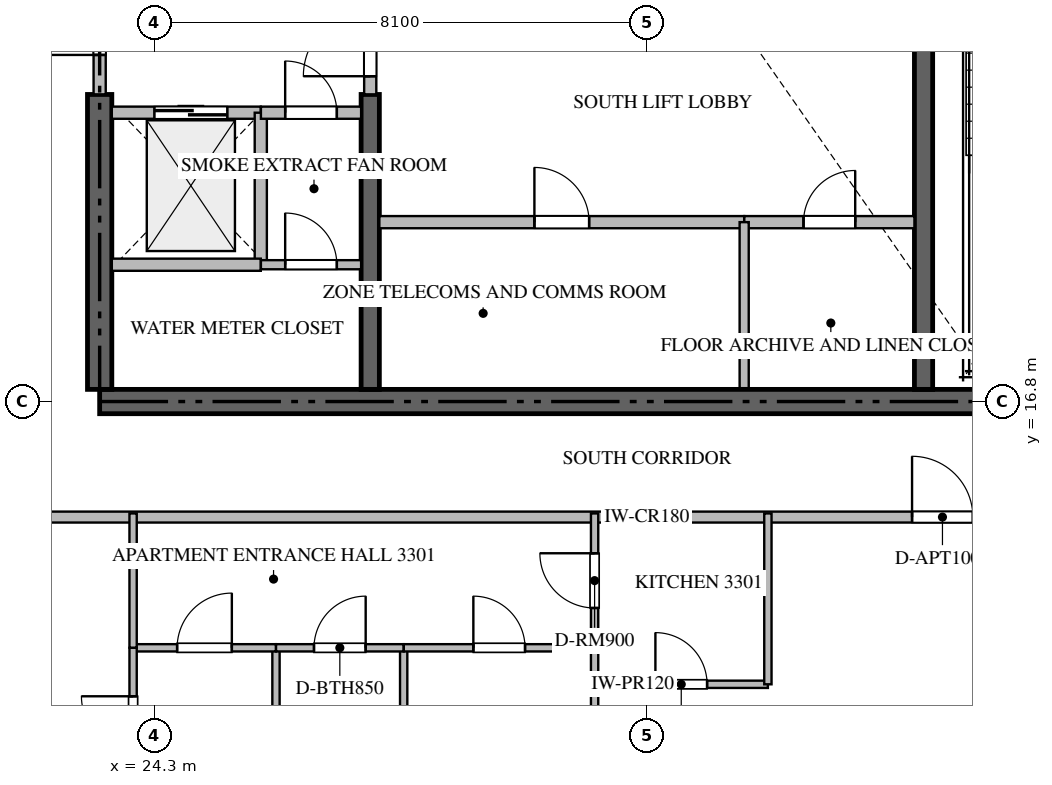
"""IFC4 building model, lengths in metres.
Left out: names, types, materials, properties, quantities, classifications, styles, units other than length and angle.
Written with IfcOpenShell. Run it as: python <this file> out.ifc"""

import sys

from ifc_helpers import new_model, si_unit, direction, frame, frame_2d, origin, place, context, subcontext, project, spatial, rectangle, extrude, source, transform, mapped, element, fill, save


model = new_model("IFC4")
c1 = context("Model", 3, precision=1e-05, world=origin(), true_north=direction((0.0, 1.0)))
c2 = subcontext(c1, "Body", "Model", "MODEL_VIEW")
j1 = project(units=[si_unit("LENGTHUNIT", "METRE"), si_unit("PLANEANGLEUNIT", "RADIAN")], contexts=[c1])
p1 = place(None, origin())
s1 = spatial("IfcSite", under=j1, at=p1, CompositionType="ELEMENT")
p2 = place(p1, origin())
s2 = spatial("IfcBuilding", under=s1, at=p2, CompositionType="ELEMENT")
p3 = place(p2, frame((0.0, 0.0, 135.15)))
s3 = spatial("IfcBuildingStorey", under=s2, at=p3, CompositionType="ELEMENT", Elevation=135.15)
p4 = place(p3, frame((23.4, 16.8, -0.26), z_axis=(0.0, 0.0, 1.0), x_axis=(1.0, 0.0, 0.0)))
e1 = element("IfcWall", 1, at=p4, inside=s3, PredefinedType="SHEAR", context=c2, shape_type="SweptSolid", body=[
    extrude(rectangle(XDim=18.0, YDim=0.4, at=frame_2d((9.0, 0.0))), origin(), (0.0, 0.0, 1.0), 3.748),
])
p5 = place(p3, frame((23.4, 17.0, -0.26), z_axis=(0.0, 0.0, 1.0), x_axis=(0.0, 1.0, 0.0)))
e2 = element("IfcWall", 2, at=p5, inside=s3, PredefinedType="SHEAR", context=c2, shape_type="SweptSolid", body=[
    extrude(rectangle(XDim=4.85, YDim=0.4, at=frame_2d((2.425, 0.0))), origin(), (0.0, 0.0, 1.0), 3.748),
])
p6 = place(p3, frame((27.85, 17.0, -0.26), z_axis=(0.0, 0.0, 1.0), x_axis=(0.0, 1.0, 0.0)))
e3 = element("IfcWall", 3, at=p6, inside=s3, PredefinedType="SHEAR", context=c2, shape_type="SweptSolid", body=[
    extrude(rectangle(XDim=4.85, YDim=0.3, at=frame_2d((2.425, 0.0))), origin(), (0.0, 0.0, 1.0), 3.748),
])
p7 = place(p3, frame((36.95, 17.0, -0.26), z_axis=(0.0, 0.0, 1.0), x_axis=(0.0, 1.0, 0.0)))
e4 = element("IfcWall", 4, at=p7, inside=s3, PredefinedType="SHEAR", context=c2, shape_type="SweptSolid", body=[
    extrude(rectangle(XDim=8.35, YDim=0.3, at=frame_2d((4.175, 0.0))), origin(), (0.0, 0.0, 1.0), 3.748),
])
p8 = place(p3, frame((23.6, 21.55, 0.0), z_axis=(0.0, 0.0, 1.0), x_axis=(1.0, 0.0, 0.0)))
e5 = element("IfcWall", 5, at=p8, inside=s3, PredefinedType="STANDARD", context=c2, shape_type="SweptSolid", body=[
    extrude(rectangle(XDim=2.45, YDim=0.2, at=frame_2d((1.225, 0.0))), origin(), (0.0, 0.0, 1.0), 3.49),
])
p9 = place(p8, frame((0.7, 0.0, 0.0)))
e6 = element("IfcOpeningElement", 6, at=p9, cuts=e5, PredefinedType="OPENING", context=c2, shape_type="SweptSolid", body=[
    extrude(rectangle(XDim=1.2, YDim=2.2, at=frame_2d((0.6, 1.1))), frame((0.0, 0.11, 0.0), z_axis=(0.0, -1.0, 0.0), x_axis=(1.0, 0.0, 0.0)), (0.0, 0.0, 1.0), 0.22),
])
p10 = place(p3, frame((26.05, 19.05, 0.0), z_axis=(0.0, 0.0, 1.0), x_axis=(0.0, 1.0, 0.0)))
e7 = element("IfcWall", 7, at=p10, inside=s3, PredefinedType="STANDARD", context=c2, shape_type="SweptSolid", body=[
    extrude(rectangle(XDim=2.5, YDim=0.2, at=frame_2d((1.25, 0.0))), origin(), (0.0, 0.0, 1.0), 3.49),
])
p11 = place(p3, frame((23.6, 19.05, 0.0), z_axis=(0.0, 0.0, 1.0), x_axis=(1.0, 0.0, 0.0)))
e8 = element("IfcWall", 8, at=p11, inside=s3, PredefinedType="STANDARD", context=c2, shape_type="SweptSolid", body=[
    extrude(rectangle(XDim=2.45, YDim=0.2, at=frame_2d((1.225, 0.0))), origin(), (0.0, 0.0, 1.0), 3.49),
])
p12 = place(p3, frame((26.052, 21.55, 0.0), z_axis=(0.0, 0.0, 1.0), x_axis=(1.0, 0.0, 0.0)))
e9 = element("IfcWall", 9, at=p12, inside=s3, PredefinedType="STANDARD", context=c2, shape_type="SweptSolid", body=[
    extrude(rectangle(XDim=1.648, YDim=0.2, at=frame_2d((0.824, 0.0))), origin(), (0.0, 0.0, 1.0), 3.49),
])
p13 = place(p12, frame((0.399, 0.0, 0.0)))
e10 = element("IfcOpeningElement", 10, at=p13, cuts=e9, PredefinedType="OPENING", context=c2, shape_type="SweptSolid", body=[
    extrude(rectangle(XDim=0.85, YDim=2.1, at=frame_2d((0.425, 1.05))), frame((0.0, 0.11, 0.0), z_axis=(0.0, -1.0, 0.0), x_axis=(1.0, 0.0, 0.0)), (0.0, 0.0, 1.0), 0.22),
])
p14 = place(p3, frame((23.4, 21.852, 0.0), z_axis=(0.0, 0.0, 1.0), x_axis=(0.0, 1.0, 0.0)))
e11 = element("IfcWall", 11, at=p14, inside=s3, PredefinedType="STANDARD", context=c2, shape_type="SweptSolid", body=[
    extrude(rectangle(XDim=2.396, YDim=0.2, at=frame_2d((1.198, 0.0))), origin(), (0.0, 0.0, 1.0), 3.49),
])
p15 = place(p14, frame((0.648, 0.0, 0.0)))
e12 = element("IfcOpeningElement", 12, at=p15, cuts=e11, PredefinedType="OPENING", context=c2, shape_type="SweptSolid", body=[
    extrude(rectangle(XDim=1.1, YDim=2.15, at=frame_2d((0.55, 1.075))), frame((0.0, 0.11, 0.0), z_axis=(0.0, -1.0, 0.0), x_axis=(1.0, 0.0, 0.0)), (0.0, 0.0, 1.0), 0.22),
])
p16 = place(p3, frame((27.85, 21.852, 0.0), z_axis=(0.0, 0.0, 1.0), x_axis=(0.0, 1.0, 0.0)))
e13 = element("IfcWall", 13, at=p16, inside=s3, PredefinedType="STANDARD", context=c2, shape_type="SweptSolid", body=[
    extrude(rectangle(XDim=1.696, YDim=0.2, at=frame_2d((0.848, 0.0))), origin(), (0.0, 0.0, 1.0), 3.49),
])
p17 = place(p16, frame((0.298, 0.0, 0.0)))
e14 = element("IfcOpeningElement", 14, at=p17, cuts=e13, PredefinedType="OPENING", context=c2, shape_type="SweptSolid", body=[
    extrude(rectangle(XDim=1.1, YDim=2.15, at=frame_2d((0.55, 1.075))), frame((0.0, 0.11, 0.0), z_axis=(0.0, -1.0, 0.0), x_axis=(1.0, 0.0, 0.0)), (0.0, 0.0, 1.0), 0.22),
])
p18 = place(p3, frame((26.052, 19.05, 0.0), z_axis=(0.0, 0.0, 1.0), x_axis=(1.0, 0.0, 0.0)))
e15 = element("IfcWall", 15, at=p18, inside=s3, PredefinedType="PARTITIONING", context=c2, shape_type="SweptSolid", body=[
    extrude(rectangle(XDim=1.648, YDim=0.15, at=frame_2d((0.824, 0.0))), origin(), (0.0, 0.0, 1.0), 3.49),
])
p19 = place(p18, frame((0.399, 0.0, 0.0)))
e16 = element("IfcOpeningElement", 16, at=p19, cuts=e15, PredefinedType="OPENING", context=c2, shape_type="SweptSolid", body=[
    extrude(rectangle(XDim=0.85, YDim=2.1, at=frame_2d((0.425, 1.05))), frame((0.0, 0.085, 0.0), z_axis=(0.0, -1.0, 0.0), x_axis=(1.0, 0.0, 0.0)), (0.0, 0.0, 1.0), 0.17),
])
p20 = place(p3, frame((28.0, 19.75, 0.0), z_axis=(0.0, 0.0, 1.0), x_axis=(1.0, 0.0, 0.0)))
e17 = element("IfcWall", 17, at=p20, inside=s3, PredefinedType="STANDARD", context=c2, shape_type="SweptSolid", body=[
    extrude(rectangle(XDim=6.0, YDim=0.2, at=frame_2d((3.0, 0.0))), origin(), (0.0, 0.0, 1.0), 3.49),
])
p21 = place(p20, frame((2.55, 0.0, 0.0)))
e18 = element("IfcOpeningElement", 18, at=p21, cuts=e17, PredefinedType="OPENING", context=c2, shape_type="SweptSolid", body=[
    extrude(rectangle(XDim=0.9, YDim=2.1, at=frame_2d((0.45, 1.05))), frame((0.0, 0.11, 0.0), z_axis=(0.0, -1.0, 0.0), x_axis=(1.0, 0.0, 0.0)), (0.0, 0.0, 1.0), 0.22),
])
p22 = place(p3, frame((34.002, 19.75, 0.0), z_axis=(0.0, 0.0, 1.0), x_axis=(1.0, 0.0, 0.0)))
e19 = element("IfcWall", 19, at=p22, inside=s3, PredefinedType="STANDARD", context=c2, shape_type="SweptSolid", body=[
    extrude(rectangle(XDim=2.798, YDim=0.2, at=frame_2d((1.399, 0.0))), origin(), (0.0, 0.0, 1.0), 3.49),
])
p23 = place(p22, frame((0.974, 0.0, 0.0)))
e20 = element("IfcOpeningElement", 20, at=p23, cuts=e19, PredefinedType="OPENING", context=c2, shape_type="SweptSolid", body=[
    extrude(rectangle(XDim=0.85, YDim=2.1, at=frame_2d((0.425, 1.05))), frame((0.0, 0.11, 0.0), z_axis=(0.0, -1.0, 0.0), x_axis=(1.0, 0.0, 0.0)), (0.0, 0.0, 1.0), 0.22),
])
p24 = place(p3, frame((34.0, 17.02, 0.0), z_axis=(0.0, 0.0, 1.0), x_axis=(0.0, 1.0, 0.0)))
e21 = element("IfcWall", 21, at=p24, inside=s3, PredefinedType="PARTITIONING", context=c2, shape_type="SweptSolid", body=[
    extrude(rectangle(XDim=2.73, YDim=0.15, at=frame_2d((1.365, 0.0))), origin(), (0.0, 0.0, 1.0), 3.49),
])
p25 = place(p3, frame((20.952, 14.9, 0.0), z_axis=(0.0, 0.0, 1.0), x_axis=(1.0, 0.0, 0.0)))
e22 = element("IfcWall", 22, at=p25, inside=s3, PredefinedType="PARTITIONING", context=c2, shape_type="SweptSolid", body=[
    extrude(rectangle(XDim=22.896, YDim=0.18, at=frame_2d((11.448, 0.0))), origin(), (0.0, 0.0, 1.0), 3.49),
])
p26 = place(p25, frame((15.809, 0.0, 0.0)))
e23 = element("IfcOpeningElement", 23, at=p26, cuts=e22, PredefinedType="OPENING", context=c2, shape_type="SweptSolid", body=[
    extrude(rectangle(XDim=1.0, YDim=2.15, at=frame_2d((0.5, 1.075))), frame((0.0, 0.1, 0.0), z_axis=(0.0, -1.0, 0.0), x_axis=(1.0, 0.0, 0.0)), (0.0, 0.0, 1.0), 0.2),
])
p27 = place(p3, frame((31.54, 12.15, 0.0), z_axis=(0.0, 0.0, 1.0), x_axis=(1.0, 0.0, 0.0)))
e24 = element("IfcWall", 24, at=p27, inside=s3, PredefinedType="PARTITIONING", context=c2, shape_type="SweptSolid", body=[
    extrude(rectangle(XDim=2.85, YDim=0.12, at=frame_2d((1.425, 0.0))), origin(), (0.0, 0.0, 1.0), 3.49),
])
p28 = place(p27, frame((1.0, 0.0, 0.0)))
e25 = element("IfcOpeningElement", 25, at=p28, cuts=e24, PredefinedType="OPENING", context=c2, shape_type="SweptSolid", body=[
    extrude(rectangle(XDim=0.85, YDim=2.1, at=frame_2d((0.425, 1.05))), frame((0.0, 0.07, 0.0), z_axis=(0.0, -1.0, 0.0), x_axis=(1.0, 0.0, 0.0)), (0.0, 0.0, 1.0), 0.14),
])
p29 = place(p3, frame((34.39, 12.15, 0.0), z_axis=(0.0, 0.0, 1.0), x_axis=(0.0, 1.0, 0.0)))
e26 = element("IfcWall", 26, at=p29, inside=s3, PredefinedType="PARTITIONING", context=c2, shape_type="SweptSolid", body=[
    extrude(rectangle(XDim=2.81, YDim=0.12, at=frame_2d((1.405, 0.0))), origin(), (0.0, 0.0, 1.0), 3.49),
])
p30 = place(p3, frame((31.54, 12.75, 0.0), z_axis=(0.0, 0.0, 1.0), x_axis=(0.0, 1.0, 0.0)))
e27 = element("IfcWall", 27, at=p30, inside=s3, PredefinedType="PARTITIONING", context=c2, shape_type="SweptSolid", body=[
    extrude(rectangle(XDim=2.21, YDim=0.12, at=frame_2d((1.105, 0.0))), origin(), (0.0, 0.0, 1.0), 3.49),
])
p31 = place(p30, frame((0.655, 0.0, 0.0)))
e28 = element("IfcOpeningElement", 28, at=p31, cuts=e27, PredefinedType="OPENING", context=c2, shape_type="SweptSolid", body=[
    extrude(rectangle(XDim=0.9, YDim=2.1, at=frame_2d((0.45, 1.05))), frame((0.0, 0.07, 0.0), z_axis=(0.0, -1.0, 0.0), x_axis=(1.0, 0.0, 0.0)), (0.0, 0.0, 1.0), 0.14),
])
p32 = place(p3, frame((31.54, 7.947, 0.0), z_axis=(0.0, 0.0, 1.0), x_axis=(0.0, 1.0, 0.0)))
e29 = element("IfcWall", 29, at=p32, inside=s3, PredefinedType="PARTITIONING", context=c2, shape_type="SweptSolid", body=[
    extrude(rectangle(XDim=4.801, YDim=0.12, at=frame_2d((2.4, 0.0))), origin(), (0.0, 0.0, 1.0), 3.49),
])
p33 = place(p3, frame((26.3, 1.495, 0.0), z_axis=(0.0, 0.0, 1.0), x_axis=(0.0, 1.0, 0.0)))
e30 = element("IfcWall", 30, at=p33, inside=s3, PredefinedType="PARTITIONING", context=c2, shape_type="SweptSolid", body=[
    extrude(rectangle(XDim=11.255, YDim=0.12, at=frame_2d((5.627, 0.0))), origin(), (0.0, 0.0, 1.0), 3.49),
])
p34 = place(p3, frame((28.4, 7.945, 0.0), z_axis=(0.0, 0.0, 1.0), x_axis=(0.0, 1.0, 0.0)))
e31 = element("IfcWall", 31, at=p34, inside=s3, PredefinedType="PARTITIONING", context=c2, shape_type="SweptSolid", body=[
    extrude(rectangle(XDim=4.805, YDim=0.12, at=frame_2d((2.402, 0.0))), origin(), (0.0, 0.0, 1.0), 3.49),
])
p35 = place(p3, frame((26.3, 12.75, 0.0), z_axis=(0.0, 0.0, 1.0), x_axis=(1.0, 0.0, 0.0)))
e32 = element("IfcWall", 32, at=p35, inside=s3, PredefinedType="PARTITIONING", context=c2, shape_type="SweptSolid", body=[
    extrude(rectangle(XDim=2.1, YDim=0.12, at=frame_2d((1.05, 0.0))), origin(), (0.0, 0.0, 1.0), 3.49),
])
p36 = place(p35, frame((0.625, 0.0, 0.0)))
e33 = element("IfcOpeningElement", 33, at=p36, cuts=e32, PredefinedType="OPENING", context=c2, shape_type="SweptSolid", body=[
    extrude(rectangle(XDim=0.85, YDim=2.1, at=frame_2d((0.425, 1.05))), frame((0.0, 0.07, 0.0), z_axis=(0.0, -1.0, 0.0), x_axis=(1.0, 0.0, 0.0)), (0.0, 0.0, 1.0), 0.14),
])
p37 = place(p3, frame((28.402, 12.75, 0.0), z_axis=(0.0, 0.0, 1.0), x_axis=(1.0, 0.0, 0.0)))
e34 = element("IfcWall", 34, at=p37, inside=s3, PredefinedType="PARTITIONING", context=c2, shape_type="SweptSolid", body=[
    extrude(rectangle(XDim=3.138, YDim=0.12, at=frame_2d((1.569, 0.0))), origin(), (0.0, 0.0, 1.0), 3.49),
])
p38 = place(p37, frame((1.144, 0.0, 0.0)))
e35 = element("IfcOpeningElement", 35, at=p38, cuts=e34, PredefinedType="OPENING", context=c2, shape_type="SweptSolid", body=[
    extrude(rectangle(XDim=0.85, YDim=2.1, at=frame_2d((0.425, 1.05))), frame((0.0, 0.07, 0.0), z_axis=(0.0, -1.0, 0.0), x_axis=(1.0, 0.0, 0.0)), (0.0, 0.0, 1.0), 0.14),
])
p39 = place(p3, frame((23.95, 12.75, 0.0), z_axis=(0.0, 0.0, 1.0), x_axis=(1.0, 0.0, 0.0)))
e36 = element("IfcWall", 36, at=p39, inside=s3, PredefinedType="PARTITIONING", context=c2, shape_type="SweptSolid", body=[
    extrude(rectangle(XDim=2.348, YDim=0.12, at=frame_2d((1.174, 0.0))), origin(), (0.0, 0.0, 1.0), 3.49),
])
p40 = place(p39, frame((0.724, 0.0, 0.0)))
e37 = element("IfcOpeningElement", 37, at=p40, cuts=e36, PredefinedType="OPENING", context=c2, shape_type="SweptSolid", body=[
    extrude(rectangle(XDim=0.9, YDim=2.1, at=frame_2d((0.45, 1.05))), frame((0.0, 0.07, 0.0), z_axis=(0.0, -1.0, 0.0), x_axis=(1.0, 0.0, 0.0)), (0.0, 0.0, 1.0), 0.14),
])
p41 = place(p3, frame((23.95, 10.305, 0.0), z_axis=(0.0, 0.0, 1.0), x_axis=(0.0, 1.0, 0.0)))
e38 = element("IfcWall", 38, at=p41, inside=s3, PredefinedType="PARTITIONING", context=c2, shape_type="SweptSolid", body=[
    extrude(rectangle(XDim=2.445, YDim=0.12, at=frame_2d((1.223, 0.0))), origin(), (0.0, 0.0, 1.0), 3.49),
])
p42 = place(p41, frame((0.798, 0.0, 0.0)))
e39 = element("IfcOpeningElement", 39, at=p42, cuts=e38, PredefinedType="OPENING", context=c2, shape_type="SweptSolid", body=[
    extrude(rectangle(XDim=0.85, YDim=2.1, at=frame_2d((0.425, 1.05))), frame((0.0, 0.07, 0.0), z_axis=(0.0, -1.0, 0.0), x_axis=(1.0, 0.0, 0.0)), (0.0, 0.0, 1.0), 0.14),
])
p43 = place(p3, frame((23.95, 12.752, 0.0), z_axis=(0.0, 0.0, 1.0), x_axis=(0.0, 1.0, 0.0)))
e40 = element("IfcWall", 40, at=p43, inside=s3, PredefinedType="PARTITIONING", context=c2, shape_type="SweptSolid", body=[
    extrude(rectangle(XDim=2.208, YDim=0.12, at=frame_2d((1.104, 0.0))), origin(), (0.0, 0.0, 1.0), 3.49),
])
m1 = source(origin(), c2, "Body", "SweptSolid", [
    extrude(rectangle(XDim=1.2, YDim=2.2, at=frame_2d((0.6, 1.1))), frame((0.0, 0.025, 0.0), z_axis=(0.0, -1.0, 0.0), x_axis=(1.0, 0.0, 0.0)), (0.0, 0.0, 1.0), 0.05),
])
p44 = place(p9, origin())
e41 = element("IfcDoor", 41, at=p44, inside=s3, OperationType="DOUBLE_DOOR_SLIDING", PredefinedType="DOOR", context=c2, shape_type="MappedRepresentation", body=[
    mapped(m1, transform((0.0, 0.0, 0.0), scale=1.0)),
])
fill(e6, e41)
m2 = source(origin(), c2, "Body", "SweptSolid", [
    extrude(rectangle(XDim=0.85, YDim=2.1, at=frame_2d((0.425, 1.05))), frame((0.0, 0.025, 0.0), z_axis=(0.0, -1.0, 0.0), x_axis=(1.0, 0.0, 0.0)), (0.0, 0.0, 1.0), 0.05),
])
p45 = place(p13, origin())
e42 = element("IfcDoor", 42, at=p45, inside=s3, OperationType="SINGLE_SWING_LEFT", PredefinedType="DOOR", context=c2, shape_type="MappedRepresentation", body=[
    mapped(m2, transform((0.0, 0.0, 0.0), scale=1.0)),
])
fill(e10, e42)
m3 = source(origin(), c2, "Body", "SweptSolid", [
    extrude(rectangle(XDim=1.1, YDim=2.15, at=frame_2d((0.55, 1.075))), frame((0.0, 0.025, 0.0), z_axis=(0.0, -1.0, 0.0), x_axis=(1.0, 0.0, 0.0)), (0.0, 0.0, 1.0), 0.05),
])
p46 = place(p15, origin())
e43 = element("IfcDoor", 43, at=p46, inside=s3, OperationType="SINGLE_SWING_LEFT", PredefinedType="DOOR", context=c2, shape_type="MappedRepresentation", body=[
    mapped(m3, transform((0.0, 0.0, 0.0), scale=1.0)),
])
fill(e12, e43)
p47 = place(p17, origin())
e44 = element("IfcDoor", 44, at=p47, inside=s3, OperationType="SINGLE_SWING_LEFT", PredefinedType="DOOR", context=c2, shape_type="MappedRepresentation", body=[
    mapped(m3, transform((0.0, 0.0, 0.0), scale=1.0)),
])
fill(e14, e44)
p48 = place(p19, origin())
e45 = element("IfcDoor", 45, at=p48, inside=s3, OperationType="SINGLE_SWING_LEFT", PredefinedType="DOOR", context=c2, shape_type="MappedRepresentation", body=[
    mapped(m2, transform((0.0, 0.0, 0.0), scale=1.0)),
])
fill(e16, e45)
m4 = source(origin(), c2, "Body", "SweptSolid", [
    extrude(rectangle(XDim=0.9, YDim=2.1, at=frame_2d((0.45, 1.05))), frame((0.0, 0.025, 0.0), z_axis=(0.0, -1.0, 0.0), x_axis=(1.0, 0.0, 0.0)), (0.0, 0.0, 1.0), 0.05),
])
p49 = place(p21, origin())
e46 = element("IfcDoor", 46, at=p49, inside=s3, OperationType="SINGLE_SWING_LEFT", PredefinedType="DOOR", context=c2, shape_type="MappedRepresentation", body=[
    mapped(m4, transform((0.0, 0.0, 0.0), scale=1.0)),
])
fill(e18, e46)
p50 = place(p23, origin())
e47 = element("IfcDoor", 47, at=p50, inside=s3, OperationType="SINGLE_SWING_RIGHT", PredefinedType="DOOR", context=c2, shape_type="MappedRepresentation", body=[
    mapped(m2, transform((0.0, 0.0, 0.0), scale=1.0)),
])
fill(e20, e47)
m5 = source(origin(), c2, "Body", "SweptSolid", [
    extrude(rectangle(XDim=1.0, YDim=2.15, at=frame_2d((0.5, 1.075))), frame((0.0, 0.025, 0.0), z_axis=(0.0, -1.0, 0.0), x_axis=(1.0, 0.0, 0.0)), (0.0, 0.0, 1.0), 0.05),
])
p51 = place(p26, origin())
e48 = element("IfcDoor", 48, at=p51, inside=s3, OperationType="SINGLE_SWING_LEFT", PredefinedType="DOOR", context=c2, shape_type="MappedRepresentation", body=[
    mapped(m5, transform((0.0, 0.0, 0.0), scale=1.0)),
])
fill(e23, e48)
p52 = place(p28, origin())
e49 = element("IfcDoor", 49, at=p52, inside=s3, OperationType="SINGLE_SWING_LEFT", PredefinedType="DOOR", context=c2, shape_type="MappedRepresentation", body=[
    mapped(m2, transform((0.0, 0.0, 0.0), scale=1.0)),
])
fill(e25, e49)
p53 = place(p31, origin())
e50 = element("IfcDoor", 50, at=p53, inside=s3, OperationType="SINGLE_SWING_RIGHT", PredefinedType="DOOR", context=c2, shape_type="MappedRepresentation", body=[
    mapped(m4, transform((0.0, 0.0, 0.0), scale=1.0)),
])
fill(e28, e50)
p54 = place(p36, origin())
e51 = element("IfcDoor", 51, at=p54, inside=s3, OperationType="SINGLE_SWING_RIGHT", PredefinedType="DOOR", context=c2, shape_type="MappedRepresentation", body=[
    mapped(m2, transform((0.0, 0.0, 0.0), scale=1.0)),
])
fill(e33, e51)
p55 = place(p38, origin())
e52 = element("IfcDoor", 52, at=p55, inside=s3, OperationType="SINGLE_SWING_LEFT", PredefinedType="DOOR", context=c2, shape_type="MappedRepresentation", body=[
    mapped(m2, transform((0.0, 0.0, 0.0), scale=1.0)),
])
fill(e35, e52)
p56 = place(p40, origin())
e53 = element("IfcDoor", 53, at=p56, inside=s3, OperationType="SINGLE_SWING_RIGHT", PredefinedType="DOOR", context=c2, shape_type="MappedRepresentation", body=[
    mapped(m4, transform((0.0, 0.0, 0.0), scale=1.0)),
])
fill(e37, e53)
p57 = place(p42, origin())
e54 = element("IfcDoor", 54, at=p57, inside=s3, OperationType="SINGLE_SWING_RIGHT", PredefinedType="DOOR", context=c2, shape_type="MappedRepresentation", body=[
    mapped(m2, transform((0.0, 0.0, 0.0), scale=1.0)),
])
fill(e39, e54)
save(model, sys.argv[1])
